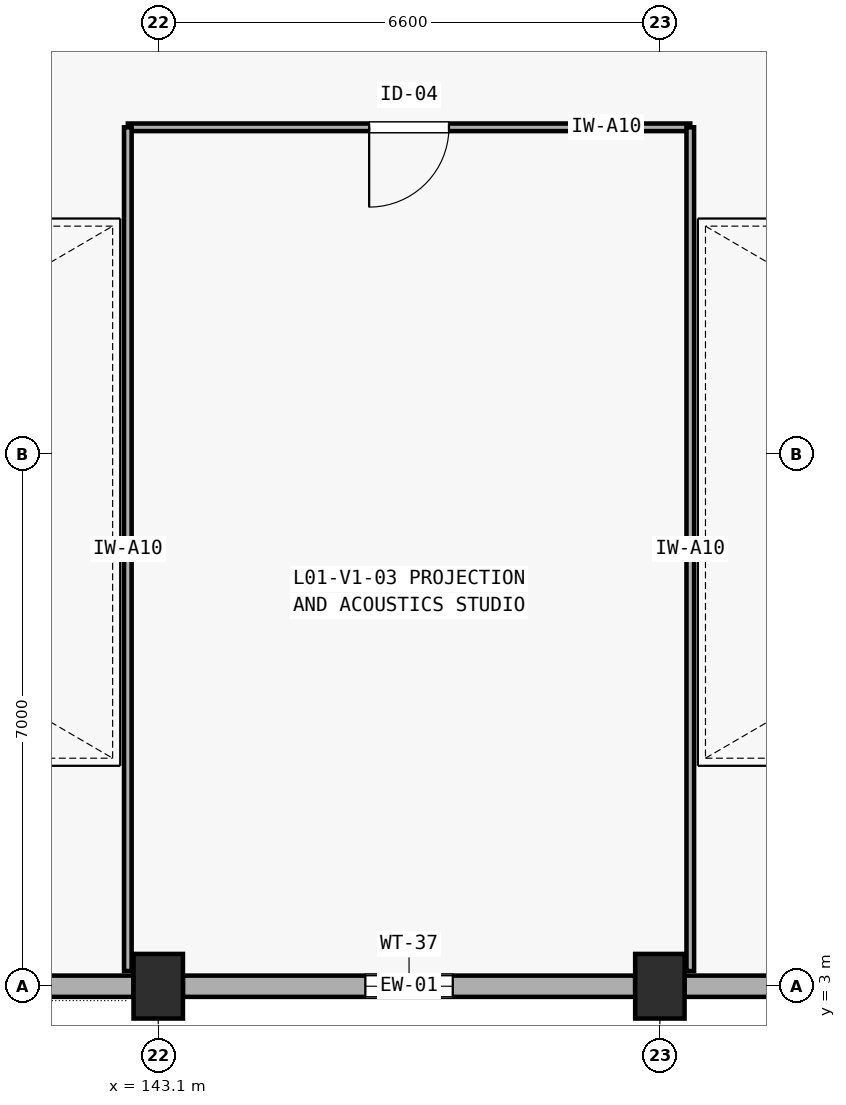
"""IFC4 building model, lengths in metres.
Left out: names, types, materials, properties, quantities, classifications, styles, units other than length and angle.
Written with IfcOpenShell. Run it as: python <this file> out.ifc"""

import sys

from ifc_helpers import new_model, si_unit, direction, frame, frame_2d, origin, origin_2d, place, context, subcontext, project, spatial, rectangle, extrude, element, fill, save


model = new_model("IFC4")
c1 = context("Model", 3, precision=1e-05, world=origin(), true_north=direction((0.0, 1.0)))
c2 = subcontext(c1, "Body", "Model", "MODEL_VIEW")
j1 = project(units=[si_unit("LENGTHUNIT", "METRE"), si_unit("PLANEANGLEUNIT", "RADIAN")], contexts=[c1])
p1 = place(None, origin())
s1 = spatial("IfcSite", under=j1, at=p1, CompositionType="ELEMENT")
p2 = place(p1, origin())
s2 = spatial("IfcBuilding", under=s1, at=p2, CompositionType="ELEMENT")
p3 = place(p2, frame((0.0, 0.0, 4.2)))
s3 = spatial("IfcBuildingStorey", under=s2, at=p3, CompositionType="ELEMENT", Elevation=4.2)
for number, where, z_axis, x_axis in (
    (1, (143.1, 3.0, 0.0), (0.0, 0.0, 1.0), (1.0, 0.0, 0.0)),
    (2, (149.7, 3.0, 0.0), (0.0, 0.0, 1.0), (1.0, 0.0, 0.0)),
):
    element("IfcColumn", number, at=place(p3, frame(where, z_axis=z_axis, x_axis=x_axis)), inside=s3, PredefinedType="COLUMN", context=c2, shape_type="SweptSolid", body=[
        extrude(rectangle(XDim=0.65, YDim=0.85, at=origin_2d()), origin(), (0.0, 0.0, 1.0), 4.2),
    ])
p4 = place(p3, frame((136.825, 3.0, 0.0), z_axis=(0.0, 0.0, 1.0), x_axis=(1.0, 0.0, 0.0)))
e3 = element("IfcWall", 3, at=p4, inside=s3, PredefinedType="SOLIDWALL", context=c2, shape_type="SweptSolid", body=[
    extrude(rectangle(XDim=5.95, YDim=0.28, at=frame_2d((2.975, 0.0))), origin(), (0.0, 0.0, 1.0), 3.285),
])
p5 = place(p4, frame((2.6, 0.0, 0.85)))
e4 = element("IfcOpeningElement", 4, at=p5, cuts=e3, PredefinedType="OPENING", context=c2, shape_type="SweptSolid", body=[
    extrude(rectangle(XDim=0.75, YDim=1.55, at=frame_2d((0.375, 0.775))), frame((0.0, 0.15, 0.0), z_axis=(0.0, -1.0, 0.0), x_axis=(1.0, 0.0, 0.0)), (0.0, 0.0, 1.0), 0.3),
])
p6 = place(p3, frame((143.425, 3.0, 0.0), z_axis=(0.0, 0.0, 1.0), x_axis=(1.0, 0.0, 0.0)))
e5 = element("IfcWall", 5, at=p6, inside=s3, PredefinedType="SOLIDWALL", context=c2, shape_type="SweptSolid", body=[
    extrude(rectangle(XDim=5.95, YDim=0.28, at=frame_2d((2.975, 0.0))), origin(), (0.0, 0.0, 1.0), 3.285),
])
p7 = place(p6, frame((2.4, 0.0, 0.85)))
e6 = element("IfcOpeningElement", 6, at=p7, cuts=e5, PredefinedType="OPENING", context=c2, shape_type="SweptSolid", body=[
    extrude(rectangle(XDim=1.15, YDim=1.55, at=frame_2d((0.575, 0.775))), frame((0.0, 0.15, 0.0), z_axis=(0.0, -1.0, 0.0), x_axis=(1.0, 0.0, 0.0)), (0.0, 0.0, 1.0), 0.3),
])
p8 = place(p3, frame((150.025, 3.0, 0.0), z_axis=(0.0, 0.0, 1.0), x_axis=(1.0, 0.0, 0.0)))
e7 = element("IfcWall", 7, at=p8, inside=s3, PredefinedType="SOLIDWALL", context=c2, shape_type="SweptSolid", body=[
    extrude(rectangle(XDim=5.95, YDim=0.28, at=frame_2d((2.975, 0.0))), origin(), (0.0, 0.0, 1.0), 3.285),
])
p9 = place(p8, frame((2.1, 0.0, 0.85)))
e8 = element("IfcOpeningElement", 8, at=p9, cuts=e7, PredefinedType="OPENING", context=c2, shape_type="SweptSolid", body=[
    extrude(rectangle(XDim=1.75, YDim=1.55, at=frame_2d((0.875, 0.775))), frame((0.0, 0.15, 0.0), z_axis=(0.0, -1.0, 0.0), x_axis=(1.0, 0.0, 0.0)), (0.0, 0.0, 1.0), 0.3),
])
p10 = place(p3, frame((142.7, 14.3, 0.0), z_axis=(0.0, 0.0, 1.0), x_axis=(1.0, 0.0, 0.0)))
e9 = element("IfcWall", 9, at=p10, inside=s3, PredefinedType="PARTITIONING", context=c2, shape_type="SweptSolid", body=[
    extrude(rectangle(XDim=7.4, YDim=0.1, at=frame_2d((3.7, 0.0))), origin(), (0.0, 0.0, 1.0), 3.9),
])
p11 = place(p10, frame((3.175, 0.0, 0.0)))
e10 = element("IfcOpeningElement", 10, at=p11, cuts=e9, PredefinedType="OPENING", context=c2, shape_type="SweptSolid", body=[
    extrude(rectangle(XDim=1.05, YDim=2.15, at=frame_2d((0.525, 1.075))), frame((0.0, 0.06, 0.0), z_axis=(0.0, -1.0, 0.0), x_axis=(1.0, 0.0, 0.0)), (0.0, 0.0, 1.0), 0.12),
])
for number, where, z_axis, x_axis in (
    (11, (142.7, 3.2, 0.0), (0.0, 0.0, 1.0), (0.0, 1.0, 0.0)),
    (12, (150.1, 3.2, 0.0), (0.0, 0.0, 1.0), (0.0, 1.0, 0.0)),
):
    element("IfcWall", number, at=place(p3, frame(where, z_axis=z_axis, x_axis=x_axis)), inside=s3, PredefinedType="PARTITIONING", context=c2, shape_type="SweptSolid", body=[
        extrude(rectangle(XDim=11.1, YDim=0.1, at=frame_2d((5.55, 0.0))), origin(), (0.0, 0.0, 1.0), 3.9),
    ])
p12 = place(p7, origin())
e13 = element("IfcWindow", 13, at=p12, inside=s3, PartitioningType="SINGLE_PANEL", PredefinedType="WINDOW", context=c2, shape_type="SweptSolid", body=[
    extrude(rectangle(XDim=1.15, YDim=1.55, at=frame_2d((0.575, 0.775))), frame((0.0, 0.03, 0.0), z_axis=(0.0, -1.0, 0.0), x_axis=(1.0, 0.0, 0.0)), (0.0, 0.0, 1.0), 0.06),
])
fill(e6, e13)
p13 = place(p11, frame((1.05, 0.0, 0.0), z_axis=(0.0, 0.0, 1.0), x_axis=(-1.0, 0.0, 0.0)))
e14 = element("IfcDoor", 14, at=p13, inside=s3, OperationType="SINGLE_SWING_RIGHT", PredefinedType="DOOR", context=c2, shape_type="SweptSolid", body=[
    extrude(rectangle(XDim=1.05, YDim=2.15, at=frame_2d((0.525, 1.075))), frame((0.0, 0.025, 0.0), z_axis=(0.0, -1.0, 0.0), x_axis=(1.0, 0.0, 0.0)), (0.0, 0.0, 1.0), 0.05),
])
fill(e10, e14)
save(model, sys.argv[1])
